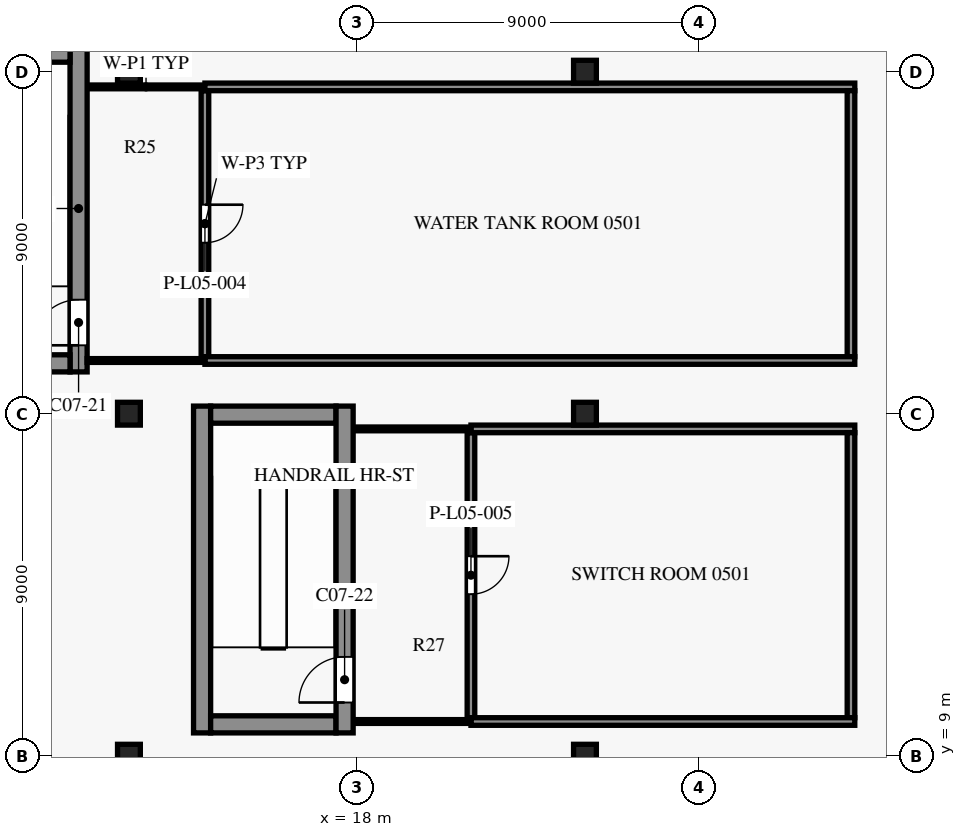
"""IFC4 building model, lengths in metres.
Left out: names, types, materials, properties, quantities, classifications, styles, units other than length and angle.
Written with IfcOpenShell. Run it as: python <this file> out.ifc"""

import sys

from ifc_helpers import new_model, si_unit, direction, frame, frame_2d, origin, origin_2d, place, context, subcontext, project, spatial, rectangle, hollow_rectangle, extrude, element, fill, save


model = new_model("IFC4")
c1 = context("Model", 3, precision=1e-05, world=origin(), true_north=direction((0.0, 1.0)))
c2 = subcontext(c1, "Body", "Model", "MODEL_VIEW")
j1 = project(units=[si_unit("LENGTHUNIT", "METRE"), si_unit("PLANEANGLEUNIT", "RADIAN")], contexts=[c1])
p1 = place(None, origin())
s1 = spatial("IfcSite", under=j1, at=p1, CompositionType="ELEMENT")
p2 = place(p1, origin())
s2 = spatial("IfcBuilding", under=s1, at=p2, CompositionType="ELEMENT")
p3 = place(p2, frame((0.0, 0.0, 32.0)))
s3 = spatial("IfcBuildingStorey", under=s2, at=p3, CompositionType="ELEMENT", Elevation=32.0)
for number, where, z_axis, x_axis in (
    (1, (12.0, 9.0, 0.0), (0.0, 0.0, 1.0), (1.0, 0.0, 0.0)),
    (2, (12.0, 18.0, 0.0), (0.0, 0.0, 1.0), (1.0, 0.0, 0.0)),
    (3, (12.0, 27.0, 0.0), (0.0, 0.0, 1.0), (1.0, 0.0, 0.0)),
    (4, (24.0, 9.0, 0.0), (0.0, 0.0, 1.0), (1.0, 0.0, 0.0)),
    (5, (24.0, 18.0, 0.0), (0.0, 0.0, 1.0), (1.0, 0.0, 0.0)),
    (6, (24.0, 27.0, 0.0), (0.0, 0.0, 1.0), (1.0, 0.0, 0.0)),
):
    element("IfcColumn", number, at=place(p3, frame(where, z_axis=z_axis, x_axis=x_axis)), inside=s3, PredefinedType="COLUMN", context=c2, shape_type="SweptSolid", body=[
        extrude(hollow_rectangle(XDim=0.6, YDim=0.6, WallThickness=0.03, InnerFilletRadius=0.03, OuterFilletRadius=0.06, at=origin_2d()), origin(), (0.0, 0.0, 1.0), 5.5),
    ])
for number, where, z_axis, x_axis in (
    (7, (14.15, 9.825, 0.0), (0.0, 0.0, 1.0), (1.0, 0.0, 0.0)),
    (8, (14.15, 17.975, 0.0), (0.0, 0.0, 1.0), (1.0, 0.0, 0.0)),
    (9, (7.15, 19.325, 0.0), (0.0, 0.0, 1.0), (1.0, 0.0, 0.0)),
    (10, (7.15, 27.475, 0.0), (0.0, 0.0, 1.0), (1.0, 0.0, 0.0)),
):
    element("IfcWall", number, at=place(p3, frame(where, z_axis=z_axis, x_axis=x_axis)), inside=s3, PredefinedType="SHEAR", context=c2, shape_type="SweptSolid", body=[
        extrude(rectangle(XDim=3.3, YDim=0.45, at=frame_2d((1.65, 0.0))), origin(), (0.0, 0.0, 1.0), 5.2),
    ])
p4 = place(p3, frame((10.675, 19.1, 0.0), z_axis=(0.0, 0.0, 1.0), x_axis=(0.0, 1.0, 0.0)))
e11 = element("IfcWall", 11, at=p4, inside=s3, PredefinedType="SHEAR", context=c2, shape_type="SweptSolid", body=[
    extrude(rectangle(XDim=8.6, YDim=0.45, at=frame_2d((4.3, 0.0))), origin(), (0.0, 0.0, 1.0), 5.2),
])
p5 = place(p4, frame((0.7, 0.0, 0.0)))
e12 = element("IfcOpeningElement", 12, at=p5, cuts=e11, PredefinedType="OPENING", context=c2, shape_type="SweptSolid", body=[
    extrude(rectangle(XDim=1.2, YDim=2.2, at=frame_2d((0.6, 1.1))), frame((0.0, 0.235, 0.0), z_axis=(0.0, -1.0, 0.0), x_axis=(1.0, 0.0, 0.0)), (0.0, 0.0, 1.0), 0.47),
])
p6 = place(p3, frame((13.925, 9.6, 0.0), z_axis=(0.0, 0.0, 1.0), x_axis=(0.0, 1.0, 0.0)))
e13 = element("IfcWall", 13, at=p6, inside=s3, PredefinedType="SHEAR", context=c2, shape_type="SweptSolid", body=[
    extrude(rectangle(XDim=8.6, YDim=0.45, at=frame_2d((4.3, 0.0))), origin(), (0.0, 0.0, 1.0), 5.2),
])
p7 = place(p3, frame((17.675, 9.6, 0.0), z_axis=(0.0, 0.0, 1.0), x_axis=(0.0, 1.0, 0.0)))
e14 = element("IfcWall", 14, at=p7, inside=s3, PredefinedType="SHEAR", context=c2, shape_type="SweptSolid", body=[
    extrude(rectangle(XDim=8.6, YDim=0.45, at=frame_2d((4.3, 0.0))), origin(), (0.0, 0.0, 1.0), 5.2),
])
p8 = place(p7, frame((0.8, 0.0, 0.0)))
e15 = element("IfcOpeningElement", 15, at=p8, cuts=e14, PredefinedType="OPENING", context=c2, shape_type="SweptSolid", body=[
    extrude(rectangle(XDim=1.2, YDim=2.2, at=frame_2d((0.6, 1.1))), frame((0.0, 0.235, 0.0), z_axis=(0.0, -1.0, 0.0), x_axis=(1.0, 0.0, 0.0)), (0.0, 0.0, 1.0), 0.47),
])
p9 = place(p3, frame((21.0, 9.9, 0.0), z_axis=(0.0, 0.0, 1.0), x_axis=(-1.0, 0.0, 0.0)))
e16 = element("IfcWall", 16, at=p9, inside=s3, PredefinedType="PARTITIONING", context=c2, shape_type="SweptSolid", body=[
    extrude(rectangle(XDim=3.1, YDim=0.1, at=frame_2d((1.55, 0.0))), origin(), (0.0, 0.0, 1.0), 5.18),
])
p10 = place(p3, frame((31.1, 9.9, 0.0), z_axis=(0.0, 0.0, 1.0), x_axis=(-1.0, 0.0, 0.0)))
e17 = element("IfcWall", 17, at=p10, inside=s3, PredefinedType="PARTITIONING", context=c2, shape_type="SweptSolid", body=[
    extrude(rectangle(XDim=10.1, YDim=0.2, at=frame_2d((5.05, 0.0))), origin(), (0.0, 0.0, 1.0), 5.18),
])
p11 = place(p3, frame((21.0, 17.5, 0.0), z_axis=(0.0, 0.0, 1.0), x_axis=(0.0, -1.0, 0.0)))
e18 = element("IfcWall", 18, at=p11, inside=s3, PredefinedType="PARTITIONING", context=c2, shape_type="SweptSolid", body=[
    extrude(rectangle(XDim=7.5, YDim=0.2, at=frame_2d((3.75, 0.0))), origin(), (0.0, 0.0, 1.0), 5.18),
])
p12 = place(p11, frame((3.25, 0.0, 0.0)))
e19 = element("IfcOpeningElement", 19, at=p12, cuts=e18, PredefinedType="OPENING", context=c2, shape_type="SweptSolid", body=[
    extrude(rectangle(XDim=1.0, YDim=2.1, at=frame_2d((0.5, 1.05))), frame((0.0, 0.11, 0.0), z_axis=(0.0, -1.0, 0.0), x_axis=(1.0, 0.0, 0.0)), (0.0, 0.0, 1.0), 0.22),
])
p13 = place(p3, frame((31.0, 17.5, 0.0), z_axis=(0.0, 0.0, 1.0), x_axis=(0.0, -1.0, 0.0)))
e20 = element("IfcWall", 20, at=p13, inside=s3, PredefinedType="PARTITIONING", context=c2, shape_type="SweptSolid", body=[
    extrude(rectangle(XDim=7.5, YDim=0.2, at=frame_2d((3.75, 0.0))), origin(), (0.0, 0.0, 1.0), 5.18),
])
p14 = place(p3, frame((17.9, 17.6, 0.0), z_axis=(0.0, 0.0, 1.0), x_axis=(1.0, 0.0, 0.0)))
e21 = element("IfcWall", 21, at=p14, inside=s3, PredefinedType="PARTITIONING", context=c2, shape_type="SweptSolid", body=[
    extrude(rectangle(XDim=3.1, YDim=0.1, at=frame_2d((1.55, 0.0))), origin(), (0.0, 0.0, 1.0), 5.18),
])
p15 = place(p3, frame((21.0, 17.6, 0.0), z_axis=(0.0, 0.0, 1.0), x_axis=(1.0, 0.0, 0.0)))
e22 = element("IfcWall", 22, at=p15, inside=s3, PredefinedType="PARTITIONING", context=c2, shape_type="SweptSolid", body=[
    extrude(rectangle(XDim=10.1, YDim=0.2, at=frame_2d((5.05, 0.0))), origin(), (0.0, 0.0, 1.0), 5.18),
])
p16 = place(p3, frame((14.0, 19.4, 0.0), z_axis=(0.0, 0.0, 1.0), x_axis=(-1.0, 0.0, 0.0)))
e23 = element("IfcWall", 23, at=p16, inside=s3, PredefinedType="PARTITIONING", context=c2, shape_type="SweptSolid", body=[
    extrude(rectangle(XDim=3.1, YDim=0.1, at=frame_2d((1.55, 0.0))), origin(), (0.0, 0.0, 1.0), 5.18),
])
p17 = place(p3, frame((31.1, 19.4, 0.0), z_axis=(0.0, 0.0, 1.0), x_axis=(-1.0, 0.0, 0.0)))
e24 = element("IfcWall", 24, at=p17, inside=s3, PredefinedType="PARTITIONING", context=c2, shape_type="SweptSolid", body=[
    extrude(rectangle(XDim=17.1, YDim=0.2, at=frame_2d((8.55, 0.0))), origin(), (0.0, 0.0, 1.0), 5.18),
])
p18 = place(p3, frame((14.0, 26.5, 0.0), z_axis=(0.0, 0.0, 1.0), x_axis=(0.0, -1.0, 0.0)))
e25 = element("IfcWall", 25, at=p18, inside=s3, PredefinedType="PARTITIONING", context=c2, shape_type="SweptSolid", body=[
    extrude(rectangle(XDim=7.0, YDim=0.2, at=frame_2d((3.5, 0.0))), origin(), (0.0, 0.0, 1.0), 5.18),
])
p19 = place(p18, frame((3.0, 0.0, 0.0)))
e26 = element("IfcOpeningElement", 26, at=p19, cuts=e25, PredefinedType="OPENING", context=c2, shape_type="SweptSolid", body=[
    extrude(rectangle(XDim=1.0, YDim=2.1, at=frame_2d((0.5, 1.05))), frame((0.0, 0.11, 0.0), z_axis=(0.0, -1.0, 0.0), x_axis=(1.0, 0.0, 0.0)), (0.0, 0.0, 1.0), 0.22),
])
p20 = place(p3, frame((31.0, 26.5, 0.0), z_axis=(0.0, 0.0, 1.0), x_axis=(0.0, -1.0, 0.0)))
e27 = element("IfcWall", 27, at=p20, inside=s3, PredefinedType="PARTITIONING", context=c2, shape_type="SweptSolid", body=[
    extrude(rectangle(XDim=7.0, YDim=0.2, at=frame_2d((3.5, 0.0))), origin(), (0.0, 0.0, 1.0), 5.18),
])
p21 = place(p3, frame((10.9, 26.6, 0.0), z_axis=(0.0, 0.0, 1.0), x_axis=(1.0, 0.0, 0.0)))
e28 = element("IfcWall", 28, at=p21, inside=s3, PredefinedType="PARTITIONING", context=c2, shape_type="SweptSolid", body=[
    extrude(rectangle(XDim=3.1, YDim=0.1, at=frame_2d((1.55, 0.0))), origin(), (0.0, 0.0, 1.0), 5.18),
])
p22 = place(p3, frame((14.0, 26.6, 0.0), z_axis=(0.0, 0.0, 1.0), x_axis=(1.0, 0.0, 0.0)))
e29 = element("IfcWall", 29, at=p22, inside=s3, PredefinedType="PARTITIONING", context=c2, shape_type="SweptSolid", body=[
    extrude(rectangle(XDim=17.1, YDim=0.2, at=frame_2d((8.55, 0.0))), origin(), (0.0, 0.0, 1.0), 5.18),
])
p23 = place(p5, origin())
e30 = element("IfcDoor", 30, at=p23, inside=s3, OperationType="SINGLE_SWING_RIGHT", PredefinedType="DOOR", context=c2, shape_type="SweptSolid", body=[
    extrude(rectangle(XDim=1.2, YDim=2.2, at=frame_2d((0.6, 1.1))), frame((0.0, 0.025, 0.0), z_axis=(0.0, -1.0, 0.0), x_axis=(1.0, 0.0, 0.0)), (0.0, 0.0, 1.0), 0.05),
])
fill(e12, e30)
p24 = place(p8, origin())
e31 = element("IfcDoor", 31, at=p24, inside=s3, OperationType="SINGLE_SWING_LEFT", PredefinedType="DOOR", context=c2, shape_type="SweptSolid", body=[
    extrude(rectangle(XDim=1.2, YDim=2.2, at=frame_2d((0.6, 1.1))), frame((0.0, 0.025, 0.0), z_axis=(0.0, -1.0, 0.0), x_axis=(1.0, 0.0, 0.0)), (0.0, 0.0, 1.0), 0.05),
])
fill(e15, e31)
p25 = place(p19, origin())
e32 = element("IfcDoor", 32, at=p25, inside=s3, OperationType="SINGLE_SWING_LEFT", PredefinedType="DOOR", context=c2, shape_type="SweptSolid", body=[
    extrude(rectangle(XDim=1.0, YDim=2.1, at=frame_2d((0.5, 1.05))), frame((0.0, 0.025, 0.0), z_axis=(0.0, -1.0, 0.0), x_axis=(1.0, 0.0, 0.0)), (0.0, 0.0, 1.0), 0.05),
])
fill(e26, e32)
p26 = place(p12, origin())
e33 = element("IfcDoor", 33, at=p26, inside=s3, OperationType="SINGLE_SWING_LEFT", PredefinedType="DOOR", context=c2, shape_type="SweptSolid", body=[
    extrude(rectangle(XDim=1.0, YDim=2.1, at=frame_2d((0.5, 1.05))), frame((0.0, 0.025, 0.0), z_axis=(0.0, -1.0, 0.0), x_axis=(1.0, 0.0, 0.0)), (0.0, 0.0, 1.0), 0.05),
])
fill(e19, e33)
save(model, sys.argv[1])
